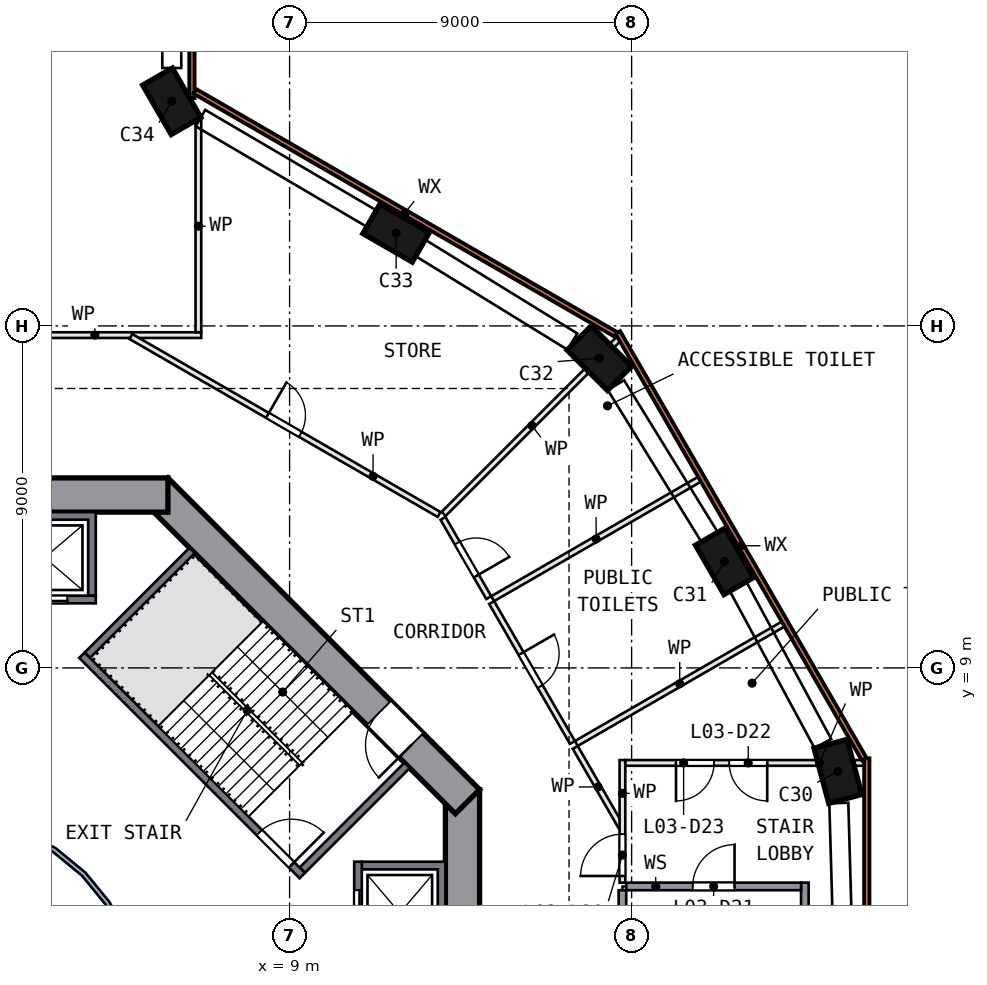
"""IFC4 building model, lengths in metres.
Left out: names, types, materials, properties, quantities, classifications, styles, units other than length and angle.
Written with IfcOpenShell. Run it as: python <this file> out.ifc"""

import sys

from ifc_helpers import new_model, si_unit, direction, frame, frame_2d, origin, origin_2d, place, context, subcontext, project, spatial, polyline, rectangle, outline, extrude, element, fill, save


model = new_model("IFC4")
c1 = context("Model", 3, precision=1e-05, world=origin(), true_north=direction((0.0, 1.0)))
c2 = subcontext(c1, "Body", "Model", "MODEL_VIEW")
j1 = project(units=[si_unit("LENGTHUNIT", "METRE"), si_unit("PLANEANGLEUNIT", "RADIAN")], contexts=[c1])
p1 = place(None, origin())
s1 = spatial("IfcSite", under=j1, at=p1, CompositionType="ELEMENT")
p2 = place(p1, origin())
s2 = spatial("IfcBuilding", under=s1, at=p2, CompositionType="ELEMENT")
p3 = place(p2, frame((0.0, 0.0, 19.0)))
s3 = spatial("IfcBuildingStorey", under=s2, at=p3, CompositionType="ELEMENT", Elevation=19.0)
for number, where, z_axis, x_axis in (
    (1, (23.428, 6.278, 0.0), (0.0, 0.0, 1.0), (0.259, -0.966, 0.0)),
    (2, (20.445, 11.804, 0.0), (0.0, 0.0, 1.0), (-0.5, 0.866, 0.0)),
    (3, (17.151, 17.151, 0.0), (0.0, 0.0, 1.0), (0.707, -0.707, 0.0)),
    (4, (11.804, 20.445, 0.0), (0.0, 0.0, 1.0), (-0.866, 0.5, 0.0)),
    (5, (5.9, 23.912, 0.0), (0.0, 0.0, 1.0), (0.5, -0.866, 0.0)),
):
    element("IfcColumn", number, at=place(p3, frame(where, z_axis=z_axis, x_axis=x_axis)), inside=s3, PredefinedType="COLUMN", context=c2, shape_type="SweptSolid", body=[
        extrude(rectangle(XDim=1.5, YDim=0.9, at=origin_2d()), origin(), (0.0, 0.0, 1.0), 4.05),
    ])
p4 = place(p3, frame((13.55, -5.799, 0.0), z_axis=(0.0, 0.0, 1.0), x_axis=(0.0, 1.0, 0.0)))
e6 = element("IfcWall", 6, at=p4, inside=s3, PredefinedType="SHEAR", context=c2, shape_type="SweptSolid", body=[
    extrude(rectangle(XDim=11.598, YDim=0.9, at=frame_2d((5.799, 0.0))), origin(), (0.0, 0.0, 1.0), 4.5),
])
p5 = place(p4, frame((4.899, 0.0, 0.0)))
e7 = element("IfcOpeningElement", 7, at=p5, cuts=e6, PredefinedType="OPENING", context=c2, shape_type="SweptSolid", body=[
    extrude(rectangle(XDim=1.8, YDim=2.1, at=frame_2d((0.9, 1.05))), frame((0.0, 0.46, 0.0), z_axis=(0.0, -1.0, 0.0), x_axis=(1.0, 0.0, 0.0)), (0.0, 0.0, 1.0), 0.92),
])
p6 = place(p3, frame((13.682, 5.481, 0.0), z_axis=(0.0, 0.0, 1.0), x_axis=(-0.707106781, 0.707106781, 0.0)))
e8 = element("IfcWall", 8, at=p6, inside=s3, PredefinedType="SHEAR", context=c2, shape_type="SweptSolid", body=[
    extrude(rectangle(XDim=11.598, YDim=0.9, at=frame_2d((5.799, 0.0))), origin(), (0.0, 0.0, 1.0), 4.5),
])
p7 = place(p6, frame((2.099, 0.0, 0.0)))
e9 = element("IfcOpeningElement", 9, at=p7, cuts=e8, PredefinedType="OPENING", context=c2, shape_type="SweptSolid", body=[
    extrude(rectangle(XDim=1.2, YDim=2.1, at=frame_2d((0.6, 1.05))), frame((0.0, 0.46, 0.0), z_axis=(0.0, -1.0, 0.0), x_axis=(1.0, 0.0, 0.0)), (0.0, 0.0, 1.0), 0.92),
])
p8 = place(p3, frame((5.799, 13.55, 0.0), z_axis=(0.0, 0.0, 1.0), x_axis=(-1.0, 0.0, 0.0)))
e10 = element("IfcWall", 10, at=p8, inside=s3, PredefinedType="SHEAR", context=c2, shape_type="SweptSolid", body=[
    extrude(rectangle(XDim=11.598, YDim=0.9, at=frame_2d((5.799, 0.0))), origin(), (0.0, 0.0, 1.0), 4.5),
])
p9 = place(p8, frame((4.899, 0.0, 0.0)))
e11 = element("IfcOpeningElement", 11, at=p9, cuts=e10, PredefinedType="OPENING", context=c2, shape_type="SweptSolid", body=[
    extrude(rectangle(XDim=1.8, YDim=2.1, at=frame_2d((0.9, 1.05))), frame((0.0, 0.46, 0.0), z_axis=(0.0, -1.0, 0.0), x_axis=(1.0, 0.0, 0.0)), (0.0, 0.0, 1.0), 0.92),
])
p10 = place(p3, frame((6.43, 23.995, 0.0), z_axis=(0.0, 0.0, 1.0), x_axis=(0.0, 1.0, 0.0)))
e12 = element("IfcWall", 12, at=p10, inside=s3, PredefinedType="SOLIDWALL", context=c2, shape_type="SweptSolid", body=[
    extrude(rectangle(XDim=17.405, YDim=0.14, at=frame_2d((8.702, 0.0))), origin(), (0.0, 0.0, 1.0), 4.05),
])
p11 = place(p10, frame((1.634, 0.0, 0.9)))
e13 = element("IfcOpeningElement", 13, at=p11, cuts=e12, PredefinedType="OPENING", context=c2, shape_type="SweptSolid", body=[
    extrude(rectangle(XDim=3.0, YDim=2.4, at=frame_2d((1.5, 1.2))), frame((0.0, 0.08, 0.0), z_axis=(0.0, -1.0, 0.0), x_axis=(1.0, 0.0, 0.0)), (0.0, 0.0, 1.0), 0.16),
])
p12 = place(p10, frame((7.334, 0.0, 0.9)))
e14 = element("IfcOpeningElement", 14, at=p12, cuts=e12, PredefinedType="OPENING", context=c2, shape_type="SweptSolid", body=[
    extrude(rectangle(XDim=3.0, YDim=2.4, at=frame_2d((1.5, 1.2))), frame((0.0, 0.08, 0.0), z_axis=(0.0, -1.0, 0.0), x_axis=(1.0, 0.0, 0.0)), (0.0, 0.0, 1.0), 0.16),
])
p13 = place(p3, frame((24.188, -6.621, 0.0), z_axis=(0.0, 0.0, 1.0), x_axis=(0.0, 1.0, 0.0)))
e15 = element("IfcWall", 15, at=p13, inside=s3, PredefinedType="SOLIDWALL", context=c2, shape_type="SweptSolid", body=[
    extrude(rectangle(XDim=13.242, YDim=0.14, at=frame_2d((6.621, 0.0))), origin(), (0.0, 0.0, 1.0), 4.05),
])
p14 = place(p3, frame((24.118, 6.603, 0.0), z_axis=(0.0, 0.0, 1.0), x_axis=(-0.499997984, 0.866026568, 0.0)))
e16 = element("IfcWall", 16, at=p14, inside=s3, PredefinedType="SOLIDWALL", context=c2, shape_type="SweptSolid", body=[
    extrude(rectangle(XDim=12.962, YDim=0.14, at=frame_2d((6.481, 0.0))), origin(), (0.0, 0.0, 1.0), 4.05),
])
p15 = place(p3, frame((17.586, 17.777, 0.0), z_axis=(0.0, 0.0, 1.0), x_axis=(-0.866023287, 0.500003667, 0.0)))
e17 = element("IfcWall", 17, at=p15, inside=s3, PredefinedType="SOLIDWALL", context=c2, shape_type="SweptSolid", body=[
    extrude(rectangle(XDim=12.801, YDim=0.14, at=frame_2d((6.4, 0.0))), origin(), (0.0, 0.0, 1.0), 4.05),
])
p16 = place(p3, origin())
e18 = element("IfcWall", 18, at=p16, inside=s3, PredefinedType="SOLIDWALL", context=c2, shape_type="SweptSolid", body=[
    extrude(outline(polyline([(13.1, 3.9), (13.1, 1.2), (10.9, 1.2), (10.9, 1.4), (12.9, 1.4), (12.9, 3.7), (10.9, 3.7), (10.9, 3.9), (13.1, 3.9)])), origin(), (0.0, 0.0, 1.0), 4.05),
])
p17 = place(p3, frame((10.8, 1.2, 0.0), z_axis=(0.0, 0.0, 1.0), x_axis=(0.0, 1.0, 0.0)))
e19 = element("IfcWall", 19, at=p17, inside=s3, PredefinedType="SOLIDWALL", context=c2, shape_type="SweptSolid", body=[
    extrude(rectangle(XDim=2.7, YDim=0.2, at=frame_2d((1.35, 0.0))), origin(), (0.0, 0.0, 1.0), 4.05),
])
p18 = place(p17, frame((0.75, 0.0, 0.0)))
e20 = element("IfcOpeningElement", 20, at=p18, cuts=e19, PredefinedType="OPENING", context=c2, shape_type="SweptSolid", body=[
    extrude(rectangle(XDim=1.2, YDim=2.1, at=frame_2d((0.6, 1.05))), frame((0.0, 0.11, 0.0), z_axis=(0.0, -1.0, 0.0), x_axis=(1.0, 0.0, 0.0)), (0.0, 0.0, 1.0), 0.22),
])
p19 = place(p3, origin())
e21 = element("IfcWall", 21, at=p19, inside=s3, PredefinedType="SOLIDWALL", context=c2, shape_type="SweptSolid", body=[
    extrude(outline(polyline([(3.9, 13.1), (3.9, 10.9), (3.7, 10.9), (3.7, 12.9), (1.4, 12.9), (1.4, 10.9), (1.2, 10.9), (1.2, 13.1), (3.9, 13.1)])), origin(), (0.0, 0.0, 1.0), 4.05),
])
p20 = place(p3, frame((1.2, 10.8, 0.0), z_axis=(0.0, 0.0, 1.0), x_axis=(1.0, 0.0, 0.0)))
e22 = element("IfcWall", 22, at=p20, inside=s3, PredefinedType="SOLIDWALL", context=c2, shape_type="SweptSolid", body=[
    extrude(rectangle(XDim=2.7, YDim=0.2, at=frame_2d((1.35, 0.0))), origin(), (0.0, 0.0, 1.0), 4.05),
])
p21 = place(p20, frame((0.75, 0.0, 0.0)))
e23 = element("IfcOpeningElement", 23, at=p21, cuts=e22, PredefinedType="OPENING", context=c2, shape_type="SweptSolid", body=[
    extrude(rectangle(XDim=1.2, YDim=2.1, at=frame_2d((0.6, 1.05))), frame((0.0, 0.11, 0.0), z_axis=(0.0, -1.0, 0.0), x_axis=(1.0, 0.0, 0.0)), (0.0, 0.0, 1.0), 0.22),
])
p22 = place(p3, frame((3.535, 9.334, 0.0), z_axis=(0.0, 0.0, 1.0), x_axis=(0.707106781, -0.707106781, 0.0)))
e24 = element("IfcWall", 24, at=p22, inside=s3, PredefinedType="SOLIDWALL", context=c2, shape_type="SweptSolid", body=[
    extrude(rectangle(XDim=8.2, YDim=0.2, at=frame_2d((4.1, 0.0))), origin(), (0.0, 0.0, 1.0), 4.05),
])
p23 = place(p22, frame((6.6, 0.0, 0.0)))
e25 = element("IfcOpeningElement", 25, at=p23, cuts=e24, PredefinedType="OPENING", context=c2, shape_type="SweptSolid", body=[
    extrude(rectangle(XDim=1.2, YDim=2.1, at=frame_2d((0.6, 1.05))), frame((0.0, 0.11, 0.0), z_axis=(0.0, -1.0, 0.0), x_axis=(1.0, 0.0, 0.0)), (0.0, 0.0, 1.0), 0.22),
])
for number, where, z_axis, x_axis in (
    (26, (9.334, 3.677, 0.0), (0.0, 0.0, 1.0), (0.707, 0.707, 0.0)),
    (27, (3.677, 9.334, 0.0), (0.0, 0.0, 1.0), (0.707, 0.707, 0.0)),
):
    element("IfcWall", number, at=place(p3, frame(where, z_axis=z_axis, x_axis=x_axis)), inside=s3, PredefinedType="SOLIDWALL", context=c2, shape_type="SweptSolid", body=[
        extrude(rectangle(XDim=3.9, YDim=0.2, at=frame_2d((1.95, 0.0))), origin(), (0.0, 0.0, 1.0), 4.05),
    ])
p24 = place(p3, origin())
e28 = element("IfcWall", 28, at=p24, inside=s3, PredefinedType="SOLIDWALL", context=c2, shape_type="SweptSolid", body=[
    extrude(outline(polyline([(5.021, -0.999), (4.73, -1.959), (4.257, -2.844), (3.62, -3.62), (2.844, -4.257), (1.959, -4.73), (0.999, -5.021), (0.0, -5.12), (-0.999, -5.021), (-1.959, -4.73), (-2.844, -4.257), (-3.62, -3.62), (-4.257, -2.844), (-4.73, -1.959), (-5.021, -0.999), (-5.12, 0.0), (-5.021, 0.999), (-4.73, 1.959), (-4.257, 2.844), (-3.62, 3.62), (-2.844, 4.257), (-1.959, 4.73), (-0.999, 5.021), (0.0, 5.12), (0.999, 5.021), (1.959, 4.73), (2.844, 4.257), (3.62, 3.62), (4.257, 2.844), (4.73, 1.959), (5.021, 0.999), (5.12, 0.0), (5.021, -0.999)]), holes=[polyline([(4.904, 0.976), (4.619, 1.913), (4.157, 2.778), (3.535, 3.535), (2.778, 4.157), (1.913, 4.619), (0.976, 4.904), (0.0, 5.0), (-0.976, 4.904), (-1.913, 4.619), (-2.778, 4.157), (-3.535, 3.535), (-4.157, 2.778), (-4.619, 1.913), (-4.904, 0.976), (-5.0, 0.0), (-4.904, -0.976), (-4.619, -1.913), (-4.157, -2.778), (-3.535, -3.535), (-2.778, -4.157), (-1.913, -4.619), (-0.976, -4.904), (0.0, -5.0), (0.976, -4.904), (1.913, -4.619), (2.778, -4.157), (3.535, -3.535), (4.157, -2.778), (4.619, -1.913), (4.904, -0.976), (5.0, 0.0), (4.904, 0.976)])]), origin(), (0.0, 0.0, 1.0), 4.05),
])
p25 = place(p3, frame((6.675, 17.758, 0.0), z_axis=(0.0, 0.0, 1.0), x_axis=(-1.0, 0.0, 0.0)))
e29 = element("IfcWall", 29, at=p25, inside=s3, PredefinedType="PARTITIONING", context=c2, shape_type="SweptSolid", body=[
    extrude(rectangle(XDim=13.35, YDim=0.15, at=frame_2d((6.675, 0.0))), origin(), (0.0, 0.0, 1.0), 4.05),
])
p26 = place(p25, frame((5.8, 0.0, 0.0)))
e30 = element("IfcOpeningElement", 30, at=p26, cuts=e29, PredefinedType="OPENING", context=c2, shape_type="SweptSolid", body=[
    extrude(rectangle(XDim=1.8, YDim=2.1, at=frame_2d((0.9, 1.05))), frame((0.0, 0.085, 0.0), z_axis=(0.0, -1.0, 0.0), x_axis=(1.0, 0.0, 0.0)), (0.0, 0.0, 1.0), 0.17),
])
p27 = place(p3, frame((4.823, 17.721, 0.0), z_axis=(0.0, 0.0, 1.0), x_axis=(0.866037142, -0.499979668, 0.0)))
e31 = element("IfcWall", 31, at=p27, inside=s3, PredefinedType="PARTITIONING", context=c2, shape_type="SweptSolid", body=[
    extrude(rectangle(XDim=9.367, YDim=0.15, at=frame_2d((4.683, 0.0))), origin(), (0.0, 0.0, 1.0), 4.05),
])
p28 = place(p27, frame((4.15, 0.0, 0.0)))
e32 = element("IfcOpeningElement", 32, at=p28, cuts=e31, PredefinedType="OPENING", context=c2, shape_type="SweptSolid", body=[
    extrude(rectangle(XDim=1.0, YDim=2.1, at=frame_2d((0.5, 1.05))), frame((0.0, 0.085, 0.0), z_axis=(0.0, -1.0, 0.0), x_axis=(1.0, 0.0, 0.0)), (0.0, 0.0, 1.0), 0.17),
])
p29 = place(p3, frame((6.6, 17.833, 0.0), z_axis=(0.0, 0.0, 1.0), x_axis=(0.0, 1.0, 0.0)))
e33 = element("IfcWall", 33, at=p29, inside=s3, PredefinedType="PARTITIONING", context=c2, shape_type="SweptSolid", body=[
    extrude(rectangle(XDim=5.582, YDim=0.15, at=frame_2d((2.791, 0.0))), origin(), (0.0, 0.0, 1.0), 4.05),
])
p30 = place(p3, frame((13.038, 12.935, 0.0), z_axis=(0.0, 0.0, 1.0), x_axis=(0.499933044, -0.866064057, 0.0)))
e34 = element("IfcWall", 34, at=p30, inside=s3, PredefinedType="PARTITIONING", context=c2, shape_type="SweptSolid", body=[
    extrude(rectangle(XDim=2.408, YDim=0.15, at=frame_2d((1.204, 0.0))), origin(), (0.0, 0.0, 1.0), 4.05),
])
p31 = place(p30, frame((0.75, 0.0, 0.0)))
e35 = element("IfcOpeningElement", 35, at=p31, cuts=e34, PredefinedType="OPENING", context=c2, shape_type="SweptSolid", body=[
    extrude(rectangle(XDim=1.0, YDim=2.1, at=frame_2d((0.5, 1.05))), frame((0.0, 0.085, 0.0), z_axis=(0.0, -1.0, 0.0), x_axis=(1.0, 0.0, 0.0)), (0.0, 0.0, 1.0), 0.17),
])
p32 = place(p3, frame((14.317, 10.719, 0.0), z_axis=(0.0, 0.0, 1.0), x_axis=(0.500037366, -0.866003829, 0.0)))
e36 = element("IfcWall", 36, at=p32, inside=s3, PredefinedType="PARTITIONING", context=c2, shape_type="SweptSolid", body=[
    extrude(rectangle(XDim=4.25, YDim=0.15, at=frame_2d((2.125, 0.0))), origin(), (0.0, 0.0, 1.0), 4.05),
])
p33 = place(p32, frame((1.55, 0.0, 0.0)))
e37 = element("IfcOpeningElement", 37, at=p33, cuts=e36, PredefinedType="OPENING", context=c2, shape_type="SweptSolid", body=[
    extrude(rectangle(XDim=1.0, YDim=2.1, at=frame_2d((0.5, 1.05))), frame((0.0, 0.085, 0.0), z_axis=(0.0, -1.0, 0.0), x_axis=(1.0, 0.0, 0.0)), (0.0, 0.0, 1.0), 0.17),
])
p34 = place(p3, frame((16.517, 6.909, 0.0), z_axis=(0.0, 0.0, 1.0), x_axis=(0.499933044, -0.866064057, 0.0)))
e38 = element("IfcWall", 38, at=p34, inside=s3, PredefinedType="PARTITIONING", context=c2, shape_type="SweptSolid", body=[
    extrude(rectangle(XDim=2.408, YDim=0.15, at=frame_2d((1.204, 0.0))), origin(), (0.0, 0.0, 1.0), 4.05),
])
p35 = place(p3, frame((17.758, 3.15, 0.0), z_axis=(0.0, 0.0, 1.0), x_axis=(0.0, -1.0, 0.0)))
e39 = element("IfcWall", 39, at=p35, inside=s3, PredefinedType="SOLIDWALL", context=c2, shape_type="SweptSolid", body=[
    extrude(rectangle(XDim=9.3, YDim=0.2, at=frame_2d((4.65, 0.0))), origin(), (0.0, 0.0, 1.0), 4.05),
])
p36 = place(p3, frame((17.758, 3.35, 0.0), z_axis=(0.0, 0.0, 1.0), x_axis=(0.0, 1.0, 0.0)))
e40 = element("IfcWall", 40, at=p36, inside=s3, PredefinedType="PARTITIONING", context=c2, shape_type="SweptSolid", body=[
    extrude(rectangle(XDim=3.225, YDim=0.15, at=frame_2d((1.613, 0.0))), origin(), (0.0, 0.0, 1.0), 4.05),
])
p37 = place(p36, frame((0.175, 0.0, 0.0)))
e41 = element("IfcOpeningElement", 41, at=p37, cuts=e40, PredefinedType="OPENING", context=c2, shape_type="SweptSolid", body=[
    extrude(rectangle(XDim=1.1, YDim=2.1, at=frame_2d((0.55, 1.05))), frame((0.0, 0.085, 0.0), z_axis=(0.0, -1.0, 0.0), x_axis=(1.0, 0.0, 0.0)), (0.0, 0.0, 1.0), 0.17),
])
p38 = place(p3, frame((17.7, 17.7, 0.0), z_axis=(0.0, 0.0, 1.0), x_axis=(-0.707106781, -0.707106781, 0.0)))
e42 = element("IfcWall", 42, at=p38, inside=s3, PredefinedType="PARTITIONING", context=c2, shape_type="SweptSolid", body=[
    extrude(rectangle(XDim=6.572, YDim=0.15, at=frame_2d((3.286, 0.0))), origin(), (0.0, 0.0, 1.0), 4.05),
])
p39 = place(p3, frame((19.787, 13.964, 0.0), z_axis=(0.0, 0.0, 1.0), x_axis=(-0.866042631, -0.49997016, 0.0)))
e43 = element("IfcWall", 43, at=p39, inside=s3, PredefinedType="PARTITIONING", context=c2, shape_type="SweptSolid", body=[
    extrude(rectangle(XDim=6.285, YDim=0.15, at=frame_2d((3.143, 0.0))), origin(), (0.0, 0.0, 1.0), 4.05),
])
p40 = place(p3, frame((21.987, 10.154, 0.0), z_axis=(0.0, 0.0, 1.0), x_axis=(-0.866032921, -0.49998698, 0.0)))
e44 = element("IfcWall", 44, at=p40, inside=s3, PredefinedType="PARTITIONING", context=c2, shape_type="SweptSolid", body=[
    extrude(rectangle(XDim=6.285, YDim=0.15, at=frame_2d((3.143, 0.0))), origin(), (0.0, 0.0, 1.0), 4.05),
])
p41 = place(p3, frame((22.558, -6.15, 0.0), z_axis=(0.0, 0.0, 1.0), x_axis=(0.0, 1.0, 0.0)))
e45 = element("IfcWall", 45, at=p41, inside=s3, PredefinedType="SOLIDWALL", context=c2, shape_type="SweptSolid", body=[
    extrude(rectangle(XDim=9.5, YDim=0.2, at=frame_2d((4.75, 0.0))), origin(), (0.0, 0.0, 1.0), 4.05),
])
p42 = place(p3, frame((17.858, 3.25, 0.0), z_axis=(0.0, 0.0, 1.0), x_axis=(1.0, 0.0, 0.0)))
e46 = element("IfcWall", 46, at=p42, inside=s3, PredefinedType="SOLIDWALL", context=c2, shape_type="SweptSolid", body=[
    extrude(rectangle(XDim=4.6, YDim=0.2, at=frame_2d((2.3, 0.0))), origin(), (0.0, 0.0, 1.0), 4.05),
])
p43 = place(p42, frame((1.75, 0.0, 0.0)))
e47 = element("IfcOpeningElement", 47, at=p43, cuts=e46, PredefinedType="OPENING", context=c2, shape_type="SweptSolid", body=[
    extrude(rectangle(XDim=1.1, YDim=2.1, at=frame_2d((0.55, 1.05))), frame((0.0, 0.11, 0.0), z_axis=(0.0, -1.0, 0.0), x_axis=(1.0, 0.0, 0.0)), (0.0, 0.0, 1.0), 0.22),
])
p44 = place(p3, frame((24.118, 6.5, 0.0), z_axis=(0.0, 0.0, 1.0), x_axis=(-1.0, 0.0, 0.0)))
e48 = element("IfcWall", 48, at=p44, inside=s3, PredefinedType="PARTITIONING", context=c2, shape_type="SweptSolid", body=[
    extrude(rectangle(XDim=6.285, YDim=0.15, at=frame_2d((3.143, 0.0))), origin(), (0.0, 0.0, 1.0), 4.05),
])
p45 = place(p44, frame((2.55, 0.0, 0.0)))
e49 = element("IfcOpeningElement", 49, at=p45, cuts=e48, PredefinedType="OPENING", context=c2, shape_type="SweptSolid", body=[
    extrude(rectangle(XDim=1.0, YDim=2.1, at=frame_2d((0.5, 1.05))), frame((0.0, 0.085, 0.0), z_axis=(0.0, -1.0, 0.0), x_axis=(1.0, 0.0, 0.0)), (0.0, 0.0, 1.0), 0.17),
])
p46 = place(p44, frame((3.95, 0.0, 0.0)))
e50 = element("IfcOpeningElement", 50, at=p46, cuts=e48, PredefinedType="OPENING", context=c2, shape_type="SweptSolid", body=[
    extrude(rectangle(XDim=1.0, YDim=2.1, at=frame_2d((0.5, 1.05))), frame((0.0, 0.085, 0.0), z_axis=(0.0, -1.0, 0.0), x_axis=(1.0, 0.0, 0.0)), (0.0, 0.0, 1.0), 0.17),
])
p47 = place(p18, origin())
e51 = element("IfcDoor", 51, at=p47, inside=s3, OperationType="DOUBLE_DOOR_SLIDING", PredefinedType="DOOR", context=c2, shape_type="SweptSolid", body=[
    extrude(rectangle(XDim=1.2, YDim=2.1, at=frame_2d((0.6, 1.05))), frame((0.0, 0.025, 0.0), z_axis=(0.0, -1.0, 0.0), x_axis=(1.0, 0.0, 0.0)), (0.0, 0.0, 1.0), 0.05),
])
fill(e20, e51)
p48 = place(p21, origin())
e52 = element("IfcDoor", 52, at=p48, inside=s3, OperationType="DOUBLE_DOOR_SLIDING", PredefinedType="DOOR", context=c2, shape_type="SweptSolid", body=[
    extrude(rectangle(XDim=1.2, YDim=2.1, at=frame_2d((0.6, 1.05))), frame((0.0, 0.025, 0.0), z_axis=(0.0, -1.0, 0.0), x_axis=(1.0, 0.0, 0.0)), (0.0, 0.0, 1.0), 0.05),
])
fill(e23, e52)
p49 = place(p23, origin())
e53 = element("IfcDoor", 53, at=p49, inside=s3, OperationType="SINGLE_SWING_RIGHT", PredefinedType="DOOR", context=c2, shape_type="SweptSolid", body=[
    extrude(rectangle(XDim=1.2, YDim=2.1, at=frame_2d((0.6, 1.05))), frame((0.0, 0.025, 0.0), z_axis=(0.0, -1.0, 0.0), x_axis=(1.0, 0.0, 0.0)), (0.0, 0.0, 1.0), 0.05),
])
fill(e25, e53)
p50 = place(p7, origin())
e54 = element("IfcDoor", 54, at=p50, inside=s3, OperationType="SINGLE_SWING_LEFT", PredefinedType="DOOR", context=c2, shape_type="SweptSolid", body=[
    extrude(rectangle(XDim=1.2, YDim=2.1, at=frame_2d((0.6, 1.05))), frame((0.0, 0.025, 0.0), z_axis=(0.0, -1.0, 0.0), x_axis=(1.0, 0.0, 0.0)), (0.0, 0.0, 1.0), 0.05),
])
fill(e9, e54)
p51 = place(p28, origin())
e55 = element("IfcDoor", 55, at=p51, inside=s3, OperationType="SINGLE_SWING_LEFT", PredefinedType="DOOR", context=c2, shape_type="SweptSolid", body=[
    extrude(rectangle(XDim=1.0, YDim=2.1, at=frame_2d((0.5, 1.05))), frame((0.0, 0.025, 0.0), z_axis=(0.0, -1.0, 0.0), x_axis=(1.0, 0.0, 0.0)), (0.0, 0.0, 1.0), 0.05),
])
fill(e32, e55)
p52 = place(p31, origin())
e56 = element("IfcDoor", 56, at=p52, inside=s3, OperationType="SINGLE_SWING_RIGHT", PredefinedType="DOOR", context=c2, shape_type="SweptSolid", body=[
    extrude(rectangle(XDim=1.0, YDim=2.1, at=frame_2d((0.5, 1.05))), frame((0.0, 0.025, 0.0), z_axis=(0.0, -1.0, 0.0), x_axis=(1.0, 0.0, 0.0)), (0.0, 0.0, 1.0), 0.05),
])
fill(e35, e56)
p53 = place(p33, origin())
e57 = element("IfcDoor", 57, at=p53, inside=s3, OperationType="SINGLE_SWING_LEFT", PredefinedType="DOOR", context=c2, shape_type="SweptSolid", body=[
    extrude(rectangle(XDim=1.0, YDim=2.1, at=frame_2d((0.5, 1.05))), frame((0.0, 0.025, 0.0), z_axis=(0.0, -1.0, 0.0), x_axis=(1.0, 0.0, 0.0)), (0.0, 0.0, 1.0), 0.05),
])
fill(e37, e57)
p54 = place(p37, origin())
e58 = element("IfcDoor", 58, at=p54, inside=s3, OperationType="SINGLE_SWING_LEFT", PredefinedType="DOOR", context=c2, shape_type="SweptSolid", body=[
    extrude(rectangle(XDim=1.1, YDim=2.1, at=frame_2d((0.55, 1.05))), frame((0.0, 0.025, 0.0), z_axis=(0.0, -1.0, 0.0), x_axis=(1.0, 0.0, 0.0)), (0.0, 0.0, 1.0), 0.05),
])
fill(e41, e58)
p55 = place(p43, origin())
e59 = element("IfcDoor", 59, at=p55, inside=s3, OperationType="SINGLE_SWING_RIGHT", PredefinedType="DOOR", context=c2, shape_type="SweptSolid", body=[
    extrude(rectangle(XDim=1.1, YDim=2.1, at=frame_2d((0.55, 1.05))), frame((0.0, 0.025, 0.0), z_axis=(0.0, -1.0, 0.0), x_axis=(1.0, 0.0, 0.0)), (0.0, 0.0, 1.0), 0.05),
])
fill(e47, e59)
p56 = place(p45, origin())
e60 = element("IfcDoor", 60, at=p56, inside=s3, OperationType="SINGLE_SWING_LEFT", PredefinedType="DOOR", context=c2, shape_type="SweptSolid", body=[
    extrude(rectangle(XDim=1.0, YDim=2.1, at=frame_2d((0.5, 1.05))), frame((0.0, 0.025, 0.0), z_axis=(0.0, -1.0, 0.0), x_axis=(1.0, 0.0, 0.0)), (0.0, 0.0, 1.0), 0.05),
])
fill(e49, e60)
p57 = place(p46, origin())
e61 = element("IfcDoor", 61, at=p57, inside=s3, OperationType="SINGLE_SWING_RIGHT", PredefinedType="DOOR", context=c2, shape_type="SweptSolid", body=[
    extrude(rectangle(XDim=1.0, YDim=2.1, at=frame_2d((0.5, 1.05))), frame((0.0, 0.025, 0.0), z_axis=(0.0, -1.0, 0.0), x_axis=(1.0, 0.0, 0.0)), (0.0, 0.0, 1.0), 0.05),
])
fill(e50, e61)
save(model, sys.argv[1])
